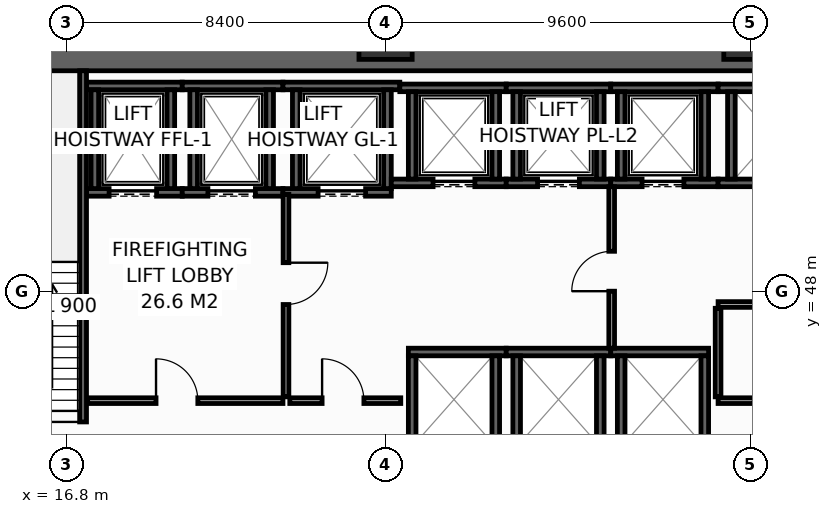
"""IFC4 building model, lengths in metres.
Left out: names, types, materials, properties, quantities, classifications, styles, units other than length and angle.
Written with IfcOpenShell. Run it as: python <this file> out.ifc"""

import sys

from ifc_helpers import new_model, si_unit, direction, frame, frame_2d, origin, origin_2d, place, context, subcontext, project, spatial, rectangle, hollow_rectangle, extrude, element, fill, save


model = new_model("IFC4")
c1 = context("Model", 3, precision=1e-05, world=origin(), true_north=direction((0.0, 1.0)))
c2 = subcontext(c1, "Body", "Model", "MODEL_VIEW")
j1 = project(units=[si_unit("LENGTHUNIT", "METRE"), si_unit("PLANEANGLEUNIT", "RADIAN")], contexts=[c1])
p1 = place(None, origin())
s1 = spatial("IfcSite", under=j1, at=p1, CompositionType="ELEMENT")
p2 = place(p1, origin())
s2 = spatial("IfcBuilding", under=s1, at=p2, CompositionType="ELEMENT")
p3 = place(p2, frame((0.0, 0.0, 33.0)))
s3 = spatial("IfcBuildingStorey", under=s2, at=p3, CompositionType="ELEMENT", Elevation=33.0)
p4 = place(p3, frame((13.5, 54.1, 0.0), z_axis=(0.0, 0.0, 1.0), x_axis=(1.0, 0.0, 0.0)))
e1 = element("IfcWall", 1, at=p4, inside=s3, PredefinedType="SHEAR", context=c2, shape_type="SweptSolid", body=[
    extrude(rectangle(XDim=32.9, YDim=0.6, at=frame_2d((16.45, 0.0))), origin(), (0.0, 0.0, 1.0), 4.95),
])
for number, where, z_axis, x_axis in (
    (2, (25.2, 54.8, 0.0), (0.0, 0.0, 1.0), (1.0, 0.0, 0.0)),
    (3, (34.8, 54.8, 0.0), (0.0, 0.0, 1.0), (1.0, 0.0, 0.0)),
):
    element("IfcColumn", number, at=place(p3, frame(where, z_axis=z_axis, x_axis=x_axis)), inside=s3, PredefinedType="COLUMN", context=c2, shape_type="SweptSolid", body=[
        extrude(hollow_rectangle(XDim=1.4, YDim=1.4, WallThickness=0.065, at=origin_2d()), origin(), (0.0, 0.0, 1.0), 5.4),
    ])
p5 = place(p3, frame((17.33, 50.6, 0.0), z_axis=(0.0, 0.0, 1.0), x_axis=(1.0, 0.0, 0.0)))
e4 = element("IfcWall", 4, at=p5, inside=s3, PredefinedType="SHEAR", context=c2, shape_type="SweptSolid", body=[
    extrude(rectangle(XDim=2.52, YDim=0.2, at=frame_2d((1.26, 0.0))), origin(), (0.0, 0.0, 1.0), 4.95),
])
p6 = place(p5, frame((0.595, 0.0, 0.0)))
e5 = element("IfcOpeningElement", 5, at=p6, cuts=e4, PredefinedType="OPENING", context=c2, shape_type="SweptSolid", body=[
    extrude(rectangle(XDim=1.25, YDim=2.3, at=frame_2d((0.625, 1.15))), frame((0.0, 0.11, 0.0), z_axis=(0.0, -1.0, 0.0), x_axis=(1.0, 0.0, 0.0)), (0.0, 0.0, 1.0), 0.22),
])
p7 = place(p3, frame((17.33, 53.4, 0.0), z_axis=(0.0, 0.0, 1.0), x_axis=(1.0, 0.0, 0.0)))
e6 = element("IfcWall", 6, at=p7, inside=s3, PredefinedType="SHEAR", context=c2, shape_type="SweptSolid", body=[
    extrude(rectangle(XDim=2.52, YDim=0.2, at=frame_2d((1.26, 0.0))), origin(), (0.0, 0.0, 1.0), 4.95),
])
for number, where, z_axis, x_axis in (
    (7, (17.55, 50.7, 0.0), (0.0, 0.0, 1.0), (0.0, 1.0, 0.0)),
    (8, (19.55, 50.7, 0.0), (0.0, 0.0, 1.0), (0.0, 1.0, 0.0)),
):
    element("IfcWall", number, at=place(p3, frame(where, z_axis=z_axis, x_axis=x_axis)), inside=s3, PredefinedType="SHEAR", context=c2, shape_type="SweptSolid", body=[
        extrude(rectangle(XDim=2.6, YDim=0.2, at=frame_2d((1.3, 0.0))), origin(), (0.0, 0.0, 1.0), 4.95),
    ])
p8 = place(p3, frame((19.85, 50.6, 0.0), z_axis=(0.0, 0.0, 1.0), x_axis=(1.0, 0.0, 0.0)))
e9 = element("IfcWall", 9, at=p8, inside=s3, PredefinedType="SHEAR", context=c2, shape_type="SweptSolid", body=[
    extrude(rectangle(XDim=2.65, YDim=0.2, at=frame_2d((1.325, 0.0))), origin(), (0.0, 0.0, 1.0), 4.95),
])
p9 = place(p8, frame((0.675, 0.0, 0.0)))
e10 = element("IfcOpeningElement", 10, at=p9, cuts=e9, PredefinedType="OPENING", context=c2, shape_type="SweptSolid", body=[
    extrude(rectangle(XDim=1.25, YDim=2.3, at=frame_2d((0.625, 1.15))), frame((0.0, 0.11, 0.0), z_axis=(0.0, -1.0, 0.0), x_axis=(1.0, 0.0, 0.0)), (0.0, 0.0, 1.0), 0.22),
])
p10 = place(p3, frame((19.85, 53.4, 0.0), z_axis=(0.0, 0.0, 1.0), x_axis=(1.0, 0.0, 0.0)))
e11 = element("IfcWall", 11, at=p10, inside=s3, PredefinedType="SHEAR", context=c2, shape_type="SweptSolid", body=[
    extrude(rectangle(XDim=2.65, YDim=0.2, at=frame_2d((1.325, 0.0))), origin(), (0.0, 0.0, 1.0), 4.95),
])
for number, where, z_axis, x_axis in (
    (12, (20.15, 50.7, 0.0), (0.0, 0.0, 1.0), (0.0, 1.0, 0.0)),
    (13, (22.15, 50.7, 0.0), (0.0, 0.0, 1.0), (0.0, 1.0, 0.0)),
):
    element("IfcWall", number, at=place(p3, frame(where, z_axis=z_axis, x_axis=x_axis)), inside=s3, PredefinedType="SHEAR", context=c2, shape_type="SweptSolid", body=[
        extrude(rectangle(XDim=2.6, YDim=0.2, at=frame_2d((1.3, 0.0))), origin(), (0.0, 0.0, 1.0), 4.95),
    ])
p11 = place(p3, frame((22.5, 50.6, 0.0), z_axis=(0.0, 0.0, 1.0), x_axis=(1.0, 0.0, 0.0)))
e14 = element("IfcWall", 14, at=p11, inside=s3, PredefinedType="SHEAR", context=c2, shape_type="SweptSolid", body=[
    extrude(rectangle(XDim=2.85, YDim=0.2, at=frame_2d((1.425, 0.0))), origin(), (0.0, 0.0, 1.0), 4.95),
])
p12 = place(p11, frame((0.925, 0.0, 0.0)))
e15 = element("IfcOpeningElement", 15, at=p12, cuts=e14, PredefinedType="OPENING", context=c2, shape_type="SweptSolid", body=[
    extrude(rectangle(XDim=1.25, YDim=2.3, at=frame_2d((0.625, 1.15))), frame((0.0, 0.11, 0.0), z_axis=(0.0, -1.0, 0.0), x_axis=(1.0, 0.0, 0.0)), (0.0, 0.0, 1.0), 0.22),
])
p13 = place(p3, frame((22.5, 53.4, 0.0), z_axis=(0.0, 0.0, 1.0), x_axis=(1.0, 0.0, 0.0)))
e16 = element("IfcWall", 16, at=p13, inside=s3, PredefinedType="SHEAR", context=c2, shape_type="SweptSolid", body=[
    extrude(rectangle(XDim=3.075, YDim=0.2, at=frame_2d((1.538, 0.0))), origin(), (0.0, 0.0, 1.0), 4.95),
])
for number, where, z_axis, x_axis in (
    (17, (22.85, 50.7, 0.0), (0.0, 0.0, 1.0), (0.0, 1.0, 0.0)),
    (18, (25.25, 50.7, 0.0), (0.0, 0.0, 1.0), (0.0, 1.0, 0.0)),
):
    element("IfcWall", number, at=place(p3, frame(where, z_axis=z_axis, x_axis=x_axis)), inside=s3, PredefinedType="SHEAR", context=c2, shape_type="SweptSolid", body=[
        extrude(rectangle(XDim=2.6, YDim=0.2, at=frame_2d((1.3, 0.0))), origin(), (0.0, 0.0, 1.0), 4.95),
    ])
p14 = place(p3, frame((25.35, 50.85, 0.0), z_axis=(0.0, 0.0, 1.0), x_axis=(1.0, 0.0, 0.0)))
e19 = element("IfcWall", 19, at=p14, inside=s3, PredefinedType="SHEAR", context=c2, shape_type="SweptSolid", body=[
    extrude(rectangle(XDim=3.025, YDim=0.2, at=frame_2d((1.512, 0.0))), origin(), (0.0, 0.0, 1.0), 4.95),
])
p15 = place(p14, frame((1.1, 0.0, 0.0)))
e20 = element("IfcOpeningElement", 20, at=p15, cuts=e19, PredefinedType="OPENING", context=c2, shape_type="SweptSolid", body=[
    extrude(rectangle(XDim=1.1, YDim=2.2, at=frame_2d((0.55, 1.1))), frame((0.0, 0.11, 0.0), z_axis=(0.0, -1.0, 0.0), x_axis=(1.0, 0.0, 0.0)), (0.0, 0.0, 1.0), 0.22),
])
p16 = place(p3, frame((25.575, 53.35, 0.0), z_axis=(0.0, 0.0, 1.0), x_axis=(1.0, 0.0, 0.0)))
e21 = element("IfcWall", 21, at=p16, inside=s3, PredefinedType="SHEAR", context=c2, shape_type="SweptSolid", body=[
    extrude(rectangle(XDim=2.8, YDim=0.2, at=frame_2d((1.4, 0.0))), origin(), (0.0, 0.0, 1.0), 4.95),
])
for number, where, z_axis, x_axis in (
    (22, (25.9, 50.95, 0.0), (0.0, 0.0, 1.0), (0.0, 1.0, 0.0)),
    (23, (28.1, 50.95, 0.0), (0.0, 0.0, 1.0), (0.0, 1.0, 0.0)),
):
    element("IfcWall", number, at=place(p3, frame(where, z_axis=z_axis, x_axis=x_axis)), inside=s3, PredefinedType="SHEAR", context=c2, shape_type="SweptSolid", body=[
        extrude(rectangle(XDim=2.3, YDim=0.2, at=frame_2d((1.15, 0.0))), origin(), (0.0, 0.0, 1.0), 4.95),
    ])
p17 = place(p3, frame((28.375, 50.85, 0.0), z_axis=(0.0, 0.0, 1.0), x_axis=(1.0, 0.0, 0.0)))
e24 = element("IfcWall", 24, at=p17, inside=s3, PredefinedType="SHEAR", context=c2, shape_type="SweptSolid", body=[
    extrude(rectangle(XDim=2.75, YDim=0.2, at=frame_2d((1.375, 0.0))), origin(), (0.0, 0.0, 1.0), 4.95),
])
p18 = place(p17, frame((0.825, 0.0, 0.0)))
e25 = element("IfcOpeningElement", 25, at=p18, cuts=e24, PredefinedType="OPENING", context=c2, shape_type="SweptSolid", body=[
    extrude(rectangle(XDim=1.1, YDim=2.2, at=frame_2d((0.55, 1.1))), frame((0.0, 0.11, 0.0), z_axis=(0.0, -1.0, 0.0), x_axis=(1.0, 0.0, 0.0)), (0.0, 0.0, 1.0), 0.22),
])
p19 = place(p3, frame((28.375, 53.35, 0.0), z_axis=(0.0, 0.0, 1.0), x_axis=(1.0, 0.0, 0.0)))
e26 = element("IfcWall", 26, at=p19, inside=s3, PredefinedType="SHEAR", context=c2, shape_type="SweptSolid", body=[
    extrude(rectangle(XDim=2.75, YDim=0.2, at=frame_2d((1.375, 0.0))), origin(), (0.0, 0.0, 1.0), 4.95),
])
for number, where, z_axis, x_axis in (
    (27, (28.65, 50.95, 0.0), (0.0, 0.0, 1.0), (0.0, 1.0, 0.0)),
    (28, (30.85, 50.95, 0.0), (0.0, 0.0, 1.0), (0.0, 1.0, 0.0)),
):
    element("IfcWall", number, at=place(p3, frame(where, z_axis=z_axis, x_axis=x_axis)), inside=s3, PredefinedType="SHEAR", context=c2, shape_type="SweptSolid", body=[
        extrude(rectangle(XDim=2.3, YDim=0.2, at=frame_2d((1.15, 0.0))), origin(), (0.0, 0.0, 1.0), 4.95),
    ])
p20 = place(p3, frame((31.125, 50.85, 0.0), z_axis=(0.0, 0.0, 1.0), x_axis=(1.0, 0.0, 0.0)))
e29 = element("IfcWall", 29, at=p20, inside=s3, PredefinedType="SHEAR", context=c2, shape_type="SweptSolid", body=[
    extrude(rectangle(XDim=2.825, YDim=0.2, at=frame_2d((1.413, 0.0))), origin(), (0.0, 0.0, 1.0), 4.95),
])
p21 = place(p20, frame((0.825, 0.0, 0.0)))
e30 = element("IfcOpeningElement", 30, at=p21, cuts=e29, PredefinedType="OPENING", context=c2, shape_type="SweptSolid", body=[
    extrude(rectangle(XDim=1.1, YDim=2.2, at=frame_2d((0.55, 1.1))), frame((0.0, 0.11, 0.0), z_axis=(0.0, -1.0, 0.0), x_axis=(1.0, 0.0, 0.0)), (0.0, 0.0, 1.0), 0.22),
])
p22 = place(p3, frame((31.125, 53.35, 0.0), z_axis=(0.0, 0.0, 1.0), x_axis=(1.0, 0.0, 0.0)))
e31 = element("IfcWall", 31, at=p22, inside=s3, PredefinedType="SHEAR", context=c2, shape_type="SweptSolid", body=[
    extrude(rectangle(XDim=2.825, YDim=0.2, at=frame_2d((1.413, 0.0))), origin(), (0.0, 0.0, 1.0), 4.95),
])
for number, where, z_axis, x_axis in (
    (32, (31.4, 50.95, 0.0), (0.0, 0.0, 1.0), (0.0, 1.0, 0.0)),
    (33, (33.6, 50.95, 0.0), (0.0, 0.0, 1.0), (0.0, 1.0, 0.0)),
):
    element("IfcWall", number, at=place(p3, frame(where, z_axis=z_axis, x_axis=x_axis)), inside=s3, PredefinedType="SHEAR", context=c2, shape_type="SweptSolid", body=[
        extrude(rectangle(XDim=2.3, YDim=0.2, at=frame_2d((1.15, 0.0))), origin(), (0.0, 0.0, 1.0), 4.95),
    ])
p23 = place(p3, frame((25.8, 46.4, 0.0), z_axis=(0.0, 0.0, 1.0), x_axis=(1.0, 0.0, 0.0)))
e34 = element("IfcWall", 34, at=p23, inside=s3, PredefinedType="SHEAR", context=c2, shape_type="SweptSolid", body=[
    extrude(rectangle(XDim=2.575, YDim=0.2, at=frame_2d((1.288, 0.0))), origin(), (0.0, 0.0, 1.0), 4.95),
])
for number, where, z_axis, x_axis in (
    (35, (25.9, 44.0, 0.0), (0.0, 0.0, 1.0), (0.0, 1.0, 0.0)),
    (36, (28.1, 44.0, 0.0), (0.0, 0.0, 1.0), (0.0, 1.0, 0.0)),
):
    element("IfcWall", number, at=place(p3, frame(where, z_axis=z_axis, x_axis=x_axis)), inside=s3, PredefinedType="SHEAR", context=c2, shape_type="SweptSolid", body=[
        extrude(rectangle(XDim=2.3, YDim=0.2, at=frame_2d((1.15, 0.0))), origin(), (0.0, 0.0, 1.0), 4.95),
    ])
p24 = place(p3, frame((28.375, 46.4, 0.0), z_axis=(0.0, 0.0, 1.0), x_axis=(1.0, 0.0, 0.0)))
e37 = element("IfcWall", 37, at=p24, inside=s3, PredefinedType="SHEAR", context=c2, shape_type="SweptSolid", body=[
    extrude(rectangle(XDim=2.75, YDim=0.2, at=frame_2d((1.375, 0.0))), origin(), (0.0, 0.0, 1.0), 4.95),
])
for number, where, z_axis, x_axis in (
    (38, (28.65, 44.0, 0.0), (0.0, 0.0, 1.0), (0.0, 1.0, 0.0)),
    (39, (30.85, 44.0, 0.0), (0.0, 0.0, 1.0), (0.0, 1.0, 0.0)),
):
    element("IfcWall", number, at=place(p3, frame(where, z_axis=z_axis, x_axis=x_axis)), inside=s3, PredefinedType="SHEAR", context=c2, shape_type="SweptSolid", body=[
        extrude(rectangle(XDim=2.3, YDim=0.2, at=frame_2d((1.15, 0.0))), origin(), (0.0, 0.0, 1.0), 4.95),
    ])
p25 = place(p3, frame((31.125, 46.4, 0.0), z_axis=(0.0, 0.0, 1.0), x_axis=(1.0, 0.0, 0.0)))
e40 = element("IfcWall", 40, at=p25, inside=s3, PredefinedType="SHEAR", context=c2, shape_type="SweptSolid", body=[
    extrude(rectangle(XDim=2.575, YDim=0.2, at=frame_2d((1.288, 0.0))), origin(), (0.0, 0.0, 1.0), 4.95),
])
for number, where, z_axis, x_axis in (
    (41, (31.4, 44.0, 0.0), (0.0, 0.0, 1.0), (0.0, 1.0, 0.0)),
    (42, (33.6, 44.0, 0.0), (0.0, 0.0, 1.0), (0.0, 1.0, 0.0)),
):
    element("IfcWall", number, at=place(p3, frame(where, z_axis=z_axis, x_axis=x_axis)), inside=s3, PredefinedType="SHEAR", context=c2, shape_type="SweptSolid", body=[
        extrude(rectangle(XDim=2.3, YDim=0.2, at=frame_2d((1.15, 0.0))), origin(), (0.0, 0.0, 1.0), 4.95),
    ])
for number, where, z_axis, x_axis in (
    (43, (33.95, 50.85, 0.0), (0.0, 0.0, 1.0), (1.0, 0.0, 0.0)),
    (44, (33.95, 53.35, 0.0), (0.0, 0.0, 1.0), (1.0, 0.0, 0.0)),
):
    element("IfcWall", number, at=place(p3, frame(where, z_axis=z_axis, x_axis=x_axis)), inside=s3, PredefinedType="SHEAR", context=c2, shape_type="SweptSolid", body=[
        extrude(rectangle(XDim=2.825, YDim=0.2, at=frame_2d((1.413, 0.0))), origin(), (0.0, 0.0, 1.0), 4.95),
    ])
p26 = place(p3, frame((34.3, 50.95, 0.0), z_axis=(0.0, 0.0, 1.0), x_axis=(0.0, 1.0, 0.0)))
e45 = element("IfcWall", 45, at=p26, inside=s3, PredefinedType="SHEAR", context=c2, shape_type="SweptSolid", body=[
    extrude(rectangle(XDim=2.3, YDim=0.2, at=frame_2d((1.15, 0.0))), origin(), (0.0, 0.0, 1.0), 4.95),
])
p27 = place(p3, frame((17.24, 43.4, 0.0), z_axis=(0.0, 0.0, 1.0), x_axis=(0.0, 1.0, 0.0)))
e46 = element("IfcWall", 46, at=p27, inside=s3, PredefinedType="SHEAR", context=c2, shape_type="SweptSolid", body=[
    extrude(rectangle(XDim=10.4, YDim=0.18, at=frame_2d((5.2, 0.0))), origin(), (0.0, 0.0, 1.0), 4.95),
])
p28 = place(p27, frame((0.16, 0.0, 0.0)))
e47 = element("IfcOpeningElement", 47, at=p28, cuts=e46, PredefinedType="OPENING", context=c2, shape_type="SweptSolid", body=[
    extrude(rectangle(XDim=1.0, YDim=2.15, at=frame_2d((0.5, 1.075))), frame((0.0, 0.1, 0.0), z_axis=(0.0, -1.0, 0.0), x_axis=(1.0, 0.0, 0.0)), (0.0, 0.0, 1.0), 0.2),
])
p29 = place(p3, frame((17.36, 45.12, 0.0), z_axis=(0.0, 0.0, 1.0), x_axis=(1.0, 0.0, 0.0)))
e48 = element("IfcWall", 48, at=p29, inside=s3, PredefinedType="PARTITIONING", context=c2, shape_type="SweptSolid", body=[
    extrude(rectangle(XDim=5.14, YDim=0.15, at=frame_2d((2.57, 0.0))), origin(), (0.0, 0.0, 1.0), 4.95),
])
p30 = place(p29, frame((1.8, 0.0, 0.0)))
e49 = element("IfcOpeningElement", 49, at=p30, cuts=e48, PredefinedType="OPENING", context=c2, shape_type="SweptSolid", body=[
    extrude(rectangle(XDim=1.1, YDim=2.15, at=frame_2d((0.55, 1.075))), frame((0.0, 0.085, 0.0), z_axis=(0.0, -1.0, 0.0), x_axis=(1.0, 0.0, 0.0)), (0.0, 0.0, 1.0), 0.17),
])
p31 = place(p3, frame((22.58, 50.55, 0.0), z_axis=(0.0, 0.0, 1.0), x_axis=(0.0, -1.0, 0.0)))
e50 = element("IfcWall", 50, at=p31, inside=s3, PredefinedType="PARTITIONING", context=c2, shape_type="SweptSolid", body=[
    extrude(rectangle(XDim=5.33, YDim=0.15, at=frame_2d((2.665, 0.0))), origin(), (0.0, 0.0, 1.0), 4.95),
])
p32 = place(p31, frame((1.8, 0.0, 0.0)))
e51 = element("IfcOpeningElement", 51, at=p32, cuts=e50, PredefinedType="OPENING", context=c2, shape_type="SweptSolid", body=[
    extrude(rectangle(XDim=1.1, YDim=2.15, at=frame_2d((0.55, 1.075))), frame((0.0, 0.085, 0.0), z_axis=(0.0, -1.0, 0.0), x_axis=(1.0, 0.0, 0.0)), (0.0, 0.0, 1.0), 0.17),
])
p33 = place(p3, frame((22.68, 45.12, 0.0), z_axis=(0.0, 0.0, 1.0), x_axis=(1.0, 0.0, 0.0)))
e52 = element("IfcWall", 52, at=p33, inside=s3, PredefinedType="PARTITIONING", context=c2, shape_type="SweptSolid", body=[
    extrude(rectangle(XDim=2.92, YDim=0.15, at=frame_2d((1.46, 0.0))), origin(), (0.0, 0.0, 1.0), 4.95),
])
p34 = place(p33, frame((0.85, 0.0, 0.0)))
e53 = element("IfcOpeningElement", 53, at=p34, cuts=e52, PredefinedType="OPENING", context=c2, shape_type="SweptSolid", body=[
    extrude(rectangle(XDim=1.1, YDim=2.15, at=frame_2d((0.55, 1.075))), frame((0.0, 0.085, 0.0), z_axis=(0.0, -1.0, 0.0), x_axis=(1.0, 0.0, 0.0)), (0.0, 0.0, 1.0), 0.17),
])
p35 = place(p3, frame((31.15, 46.5, 0.0), z_axis=(0.0, 0.0, 1.0), x_axis=(0.0, 1.0, 0.0)))
e54 = element("IfcWall", 54, at=p35, inside=s3, PredefinedType="PARTITIONING", context=c2, shape_type="SweptSolid", body=[
    extrude(rectangle(XDim=4.25, YDim=0.15, at=frame_2d((2.125, 0.0))), origin(), (0.0, 0.0, 1.0), 4.95),
])
p36 = place(p35, frame((1.5, 0.0, 0.0)))
e55 = element("IfcOpeningElement", 55, at=p36, cuts=e54, PredefinedType="OPENING", context=c2, shape_type="SweptSolid", body=[
    extrude(rectangle(XDim=1.05, YDim=2.15, at=frame_2d((0.525, 1.075))), frame((0.0, 0.085, 0.0), z_axis=(0.0, -1.0, 0.0), x_axis=(1.0, 0.0, 0.0)), (0.0, 0.0, 1.0), 0.17),
])
p37 = place(p3, frame((33.95, 45.12, 0.0), z_axis=(0.0, 0.0, 1.0), x_axis=(1.0, 0.0, 0.0)))
e56 = element("IfcWall", 56, at=p37, inside=s3, PredefinedType="PARTITIONING", context=c2, shape_type="SweptSolid", body=[
    extrude(rectangle(XDim=8.55, YDim=0.15, at=frame_2d((4.275, 0.0))), origin(), (0.0, 0.0, 1.0), 4.95),
])
p38 = place(p37, frame((0.95, 0.0, 0.0)))
e57 = element("IfcOpeningElement", 57, at=p38, cuts=e56, PredefinedType="OPENING", context=c2, shape_type="SweptSolid", body=[
    extrude(rectangle(XDim=0.95, YDim=2.15, at=frame_2d((0.475, 1.075))), frame((0.0, 0.085, 0.0), z_axis=(0.0, -1.0, 0.0), x_axis=(1.0, 0.0, 0.0)), (0.0, 0.0, 1.0), 0.17),
])
p39 = place(p37, frame((3.8, 0.0, 0.0)))
e58 = element("IfcOpeningElement", 58, at=p39, cuts=e56, PredefinedType="OPENING", context=c2, shape_type="SweptSolid", body=[
    extrude(rectangle(XDim=0.95, YDim=2.15, at=frame_2d((0.475, 1.075))), frame((0.0, 0.085, 0.0), z_axis=(0.0, -1.0, 0.0), x_axis=(1.0, 0.0, 0.0)), (0.0, 0.0, 1.0), 0.17),
])
p40 = place(p37, frame((6.65, 0.0, 0.0)))
e59 = element("IfcOpeningElement", 59, at=p40, cuts=e56, PredefinedType="OPENING", context=c2, shape_type="SweptSolid", body=[
    extrude(rectangle(XDim=0.95, YDim=2.15, at=frame_2d((0.475, 1.075))), frame((0.0, 0.085, 0.0), z_axis=(0.0, -1.0, 0.0), x_axis=(1.0, 0.0, 0.0)), (0.0, 0.0, 1.0), 0.17),
])
p41 = place(p3, frame((33.95, 47.65, 0.0), z_axis=(0.0, 0.0, 1.0), x_axis=(1.0, 0.0, 0.0)))
e60 = element("IfcWall", 60, at=p41, inside=s3, PredefinedType="PARTITIONING", context=c2, shape_type="SweptSolid", body=[
    extrude(rectangle(XDim=8.55, YDim=0.15, at=frame_2d((4.275, 0.0))), origin(), (0.0, 0.0, 1.0), 4.95),
])
p42 = place(p3, frame((33.95, 45.22, 0.0), z_axis=(0.0, 0.0, 1.0), x_axis=(0.0, 1.0, 0.0)))
e61 = element("IfcWall", 61, at=p42, inside=s3, PredefinedType="PARTITIONING", context=c2, shape_type="SweptSolid", body=[
    extrude(rectangle(XDim=2.33, YDim=0.15, at=frame_2d((1.165, 0.0))), origin(), (0.0, 0.0, 1.0), 4.95),
])
p43 = place(p6, origin())
e62 = element("IfcDoor", 62, at=p43, inside=s3, OperationType="SLIDING_TO_LEFT", PredefinedType="DOOR", context=c2, shape_type="SweptSolid", body=[
    extrude(rectangle(XDim=1.25, YDim=2.3, at=frame_2d((0.625, 1.15))), frame((0.0, 0.025, 0.0), z_axis=(0.0, -1.0, 0.0), x_axis=(1.0, 0.0, 0.0)), (0.0, 0.0, 1.0), 0.05),
])
fill(e5, e62)
p44 = place(p9, origin())
e63 = element("IfcDoor", 63, at=p44, inside=s3, OperationType="SLIDING_TO_LEFT", PredefinedType="DOOR", context=c2, shape_type="SweptSolid", body=[
    extrude(rectangle(XDim=1.25, YDim=2.3, at=frame_2d((0.625, 1.15))), frame((0.0, 0.025, 0.0), z_axis=(0.0, -1.0, 0.0), x_axis=(1.0, 0.0, 0.0)), (0.0, 0.0, 1.0), 0.05),
])
fill(e10, e63)
p45 = place(p12, origin())
e64 = element("IfcDoor", 64, at=p45, inside=s3, OperationType="SLIDING_TO_LEFT", PredefinedType="DOOR", context=c2, shape_type="SweptSolid", body=[
    extrude(rectangle(XDim=1.25, YDim=2.3, at=frame_2d((0.625, 1.15))), frame((0.0, 0.025, 0.0), z_axis=(0.0, -1.0, 0.0), x_axis=(1.0, 0.0, 0.0)), (0.0, 0.0, 1.0), 0.05),
])
fill(e15, e64)
p46 = place(p15, origin())
e65 = element("IfcDoor", 65, at=p46, inside=s3, OperationType="SLIDING_TO_LEFT", PredefinedType="DOOR", context=c2, shape_type="SweptSolid", body=[
    extrude(rectangle(XDim=1.1, YDim=2.2, at=frame_2d((0.55, 1.1))), frame((0.0, 0.025, 0.0), z_axis=(0.0, -1.0, 0.0), x_axis=(1.0, 0.0, 0.0)), (0.0, 0.0, 1.0), 0.05),
])
fill(e20, e65)
p47 = place(p18, origin())
e66 = element("IfcDoor", 66, at=p47, inside=s3, OperationType="SLIDING_TO_LEFT", PredefinedType="DOOR", context=c2, shape_type="SweptSolid", body=[
    extrude(rectangle(XDim=1.1, YDim=2.2, at=frame_2d((0.55, 1.1))), frame((0.0, 0.025, 0.0), z_axis=(0.0, -1.0, 0.0), x_axis=(1.0, 0.0, 0.0)), (0.0, 0.0, 1.0), 0.05),
])
fill(e25, e66)
p48 = place(p21, origin())
e67 = element("IfcDoor", 67, at=p48, inside=s3, OperationType="SLIDING_TO_LEFT", PredefinedType="DOOR", context=c2, shape_type="SweptSolid", body=[
    extrude(rectangle(XDim=1.1, YDim=2.2, at=frame_2d((0.55, 1.1))), frame((0.0, 0.025, 0.0), z_axis=(0.0, -1.0, 0.0), x_axis=(1.0, 0.0, 0.0)), (0.0, 0.0, 1.0), 0.05),
])
fill(e30, e67)
p49 = place(p28, origin())
e68 = element("IfcDoor", 68, at=p49, inside=s3, OperationType="SINGLE_SWING_RIGHT", PredefinedType="DOOR", context=c2, shape_type="SweptSolid", body=[
    extrude(rectangle(XDim=1.0, YDim=2.15, at=frame_2d((0.5, 1.075))), frame((0.0, 0.025, 0.0), z_axis=(0.0, -1.0, 0.0), x_axis=(1.0, 0.0, 0.0)), (0.0, 0.0, 1.0), 0.05),
])
fill(e47, e68)
p50 = place(p30, origin())
e69 = element("IfcDoor", 69, at=p50, inside=s3, OperationType="SINGLE_SWING_LEFT", PredefinedType="DOOR", context=c2, shape_type="SweptSolid", body=[
    extrude(rectangle(XDim=1.1, YDim=2.15, at=frame_2d((0.55, 1.075))), frame((0.0, 0.025, 0.0), z_axis=(0.0, -1.0, 0.0), x_axis=(1.0, 0.0, 0.0)), (0.0, 0.0, 1.0), 0.05),
])
fill(e49, e69)
p51 = place(p32, origin())
e70 = element("IfcDoor", 70, at=p51, inside=s3, OperationType="SINGLE_SWING_LEFT", PredefinedType="DOOR", context=c2, shape_type="SweptSolid", body=[
    extrude(rectangle(XDim=1.1, YDim=2.15, at=frame_2d((0.55, 1.075))), frame((0.0, 0.025, 0.0), z_axis=(0.0, -1.0, 0.0), x_axis=(1.0, 0.0, 0.0)), (0.0, 0.0, 1.0), 0.05),
])
fill(e51, e70)
p52 = place(p34, origin())
e71 = element("IfcDoor", 71, at=p52, inside=s3, OperationType="SINGLE_SWING_LEFT", PredefinedType="DOOR", context=c2, shape_type="SweptSolid", body=[
    extrude(rectangle(XDim=1.1, YDim=2.15, at=frame_2d((0.55, 1.075))), frame((0.0, 0.025, 0.0), z_axis=(0.0, -1.0, 0.0), x_axis=(1.0, 0.0, 0.0)), (0.0, 0.0, 1.0), 0.05),
])
fill(e53, e71)
p53 = place(p36, origin())
e72 = element("IfcDoor", 72, at=p53, inside=s3, OperationType="SINGLE_SWING_LEFT", PredefinedType="DOOR", context=c2, shape_type="SweptSolid", body=[
    extrude(rectangle(XDim=1.05, YDim=2.15, at=frame_2d((0.525, 1.075))), frame((0.0, 0.025, 0.0), z_axis=(0.0, -1.0, 0.0), x_axis=(1.0, 0.0, 0.0)), (0.0, 0.0, 1.0), 0.05),
])
fill(e55, e72)
save(model, sys.argv[1])
